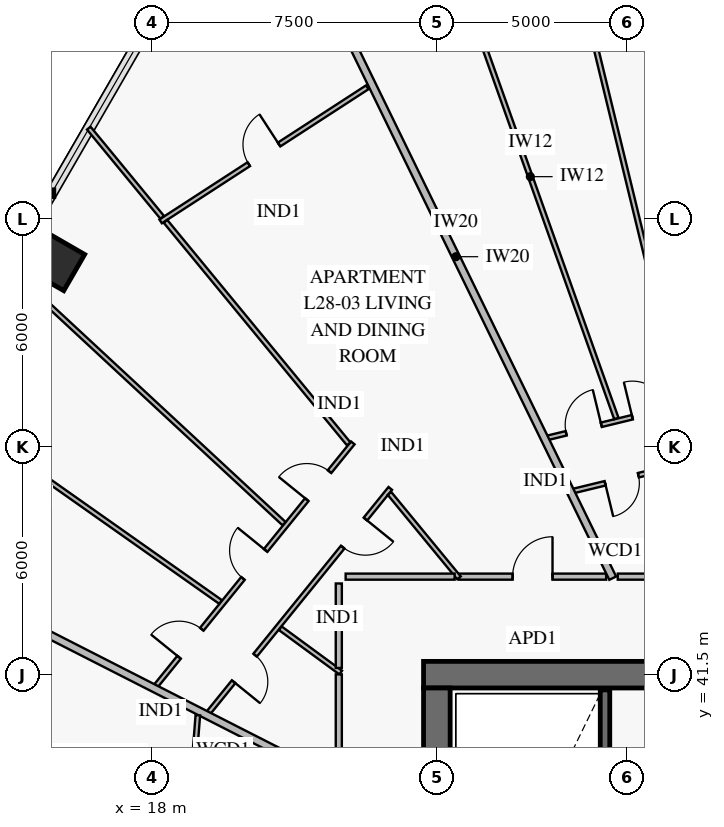
"""IFC4 building model, lengths in metres.
Left out: names, types, materials, properties, quantities, classifications, styles, units other than length and angle.
Written with IfcOpenShell. Run it as: python <this file> out.ifc"""

import sys

from ifc_helpers import new_model, si_unit, direction, frame, frame_2d, origin, origin_2d, place, context, subcontext, project, spatial, rectangle, extrude, element, fill, save


model = new_model("IFC4")
c1 = context("Model", 3, precision=1e-05, world=origin(), true_north=direction((0.0, 1.0)))
c2 = subcontext(c1, "Body", "Model", "MODEL_VIEW")
j1 = project(units=[si_unit("LENGTHUNIT", "METRE"), si_unit("PLANEANGLEUNIT", "RADIAN")], contexts=[c1])
p1 = place(None, origin())
s1 = spatial("IfcSite", under=j1, at=p1, CompositionType="ELEMENT")
p2 = place(p1, origin())
s2 = spatial("IfcBuilding", under=s1, at=p2, CompositionType="ELEMENT")
p3 = place(p2, frame((0.0, 0.0, 115.2)))
s3 = spatial("IfcBuildingStorey", under=s2, at=p3, CompositionType="ELEMENT", Elevation=115.2)
p4 = place(p3, frame((36.75, 41.5, 0.0), z_axis=(0.0, 0.0, 1.0), x_axis=(-1.0, 0.0, 0.0)))
e1 = element("IfcWall", 1, at=p4, inside=s3, PredefinedType="SHEAR", context=c2, shape_type="SweptSolid", body=[
    extrude(rectangle(XDim=11.6, YDim=0.7, at=frame_2d((5.8, 0.0))), origin(), (0.0, 0.0, 1.0), 3.8),
])
p5 = place(p4, frame((4.25, 0.0, 0.0)))
e2 = element("IfcOpeningElement", 2, at=p5, cuts=e1, PredefinedType="OPENING", context=c2, shape_type="SweptSolid", body=[
    extrude(rectangle(XDim=1.1, YDim=2.15, at=frame_2d((0.55, 1.075))), frame((0.0, 0.362, 0.0), z_axis=(0.0, -1.0, 0.0), x_axis=(1.0, 0.0, 0.0)), (0.0, 0.0, 1.0), 0.724),
])
p6 = place(p3, frame((25.5, 22.85, 0.0), z_axis=(0.0, 0.0, 1.0), x_axis=(0.0, 1.0, 0.0)))
e3 = element("IfcWall", 3, at=p6, inside=s3, PredefinedType="SHEAR", context=c2, shape_type="SweptSolid", body=[
    extrude(rectangle(XDim=18.3, YDim=0.7, at=frame_2d((9.15, 0.0))), origin(), (0.0, 0.0, 1.0), 3.8),
])
p7 = place(p6, frame((8.9, 0.0, 0.0)))
e4 = element("IfcOpeningElement", 4, at=p7, cuts=e3, PredefinedType="OPENING", context=c2, shape_type="SweptSolid", body=[
    extrude(rectangle(XDim=1.1, YDim=2.15, at=frame_2d((0.55, 1.075))), frame((0.0, 0.362, 0.0), z_axis=(0.0, -1.0, 0.0), x_axis=(1.0, 0.0, 0.0)), (0.0, 0.0, 1.0), 0.724),
])
p8 = place(p3, frame((15.481, 52.357, 0.0), z_axis=(0.0, 0.0, 1.0), x_axis=(-0.5, -0.866025403784, 0.0)))
e5 = element("IfcColumn", 5, at=p8, inside=s3, PredefinedType="COLUMN", context=c2, shape_type="SweptSolid", body=[
    extrude(rectangle(XDim=1.1, YDim=1.1, at=origin_2d()), origin(), (0.0, 0.0, 1.0), 3.55),
])
p9 = place(p3, frame((29.925, 31.4, 0.0), z_axis=(0.0, 0.0, 1.0), x_axis=(0.0, 1.0, 0.0)))
e6 = element("IfcWall", 6, at=p9, inside=s3, PredefinedType="SOLIDWALL", context=c2, shape_type="SweptSolid", body=[
    extrude(rectangle(XDim=9.7, YDim=0.25, at=frame_2d((4.85, 0.0))), origin(), (0.0, 0.0, 1.0), 3.8),
])
p10 = place(p3, frame((35.594, 47.914, 0.0), z_axis=(0.0, 0.0, 1.0), x_axis=(-0.971707679159, -0.236186761404, 0.0)))
e7 = element("IfcWall", 7, at=p10, inside=s3, PredefinedType="PARTITIONING", context=c2, shape_type="SweptSolid", body=[
    extrude(rectangle(XDim=6.728, YDim=0.12, at=frame_2d((3.364, 0.0))), origin(), (0.0, 0.0, 1.0), 2.85),
])
p11 = place(p10, frame((1.644, 0.0, 0.0)))
e8 = element("IfcOpeningElement", 8, at=p11, cuts=e7, PredefinedType="OPENING", context=c2, shape_type="SweptSolid", body=[
    extrude(rectangle(XDim=0.95, YDim=2.1, at=frame_2d((0.475, 1.05))), frame((0.0, 0.072, 0.0), z_axis=(0.0, -1.0, 0.0), x_axis=(1.0, 0.0, 0.0)), (0.0, 0.0, 1.0), 0.144),
])
p12 = place(p10, frame((4.931, 0.0, 0.0)))
e9 = element("IfcOpeningElement", 9, at=p12, cuts=e7, PredefinedType="OPENING", context=c2, shape_type="SweptSolid", body=[
    extrude(rectangle(XDim=0.9, YDim=2.1, at=frame_2d((0.45, 1.05))), frame((0.0, 0.072, 0.0), z_axis=(0.0, -1.0, 0.0), x_axis=(1.0, 0.0, 0.0)), (0.0, 0.0, 1.0), 0.144),
])
p13 = place(p3, frame((35.545, 49.466, 0.0), z_axis=(0.0, 0.0, 1.0), x_axis=(-0.971712641416, -0.236166345002, 0.0)))
e10 = element("IfcWall", 10, at=p13, inside=s3, PredefinedType="PARTITIONING", context=c2, shape_type="SweptSolid", body=[
    extrude(rectangle(XDim=7.365, YDim=0.12, at=frame_2d((3.683, 0.0))), origin(), (0.0, 0.0, 1.0), 2.85),
])
p14 = place(p13, frame((0.531, 0.0, 0.0)))
e11 = element("IfcOpeningElement", 11, at=p14, cuts=e10, PredefinedType="OPENING", context=c2, shape_type="SweptSolid", body=[
    extrude(rectangle(XDim=0.95, YDim=2.1, at=frame_2d((0.475, 1.05))), frame((0.0, 0.072, 0.0), z_axis=(0.0, -1.0, 0.0), x_axis=(1.0, 0.0, 0.0)), (0.0, 0.0, 1.0), 0.144),
])
p15 = place(p13, frame((2.322, 0.0, 0.0)))
e12 = element("IfcOpeningElement", 12, at=p15, cuts=e10, PredefinedType="OPENING", context=c2, shape_type="SweptSolid", body=[
    extrude(rectangle(XDim=0.95, YDim=2.1, at=frame_2d((0.475, 1.05))), frame((0.0, 0.072, 0.0), z_axis=(0.0, -1.0, 0.0), x_axis=(1.0, 0.0, 0.0)), (0.0, 0.0, 1.0), 0.144),
])
p16 = place(p13, frame((4.094, 0.0, 0.0)))
e13 = element("IfcOpeningElement", 13, at=p16, cuts=e10, PredefinedType="OPENING", context=c2, shape_type="SweptSolid", body=[
    extrude(rectangle(XDim=0.95, YDim=2.1, at=frame_2d((0.475, 1.05))), frame((0.0, 0.072, 0.0), z_axis=(0.0, -1.0, 0.0), x_axis=(1.0, 0.0, 0.0)), (0.0, 0.0, 1.0), 0.144),
])
p17 = place(p13, frame((5.885, 0.0, 0.0)))
e14 = element("IfcOpeningElement", 14, at=p17, cuts=e10, PredefinedType="OPENING", context=c2, shape_type="SweptSolid", body=[
    extrude(rectangle(XDim=0.95, YDim=2.1, at=frame_2d((0.475, 1.05))), frame((0.0, 0.072, 0.0), z_axis=(0.0, -1.0, 0.0), x_axis=(1.0, 0.0, 0.0)), (0.0, 0.0, 1.0), 0.144),
])
p18 = place(p3, frame((23.669, 56.957, 0.0), z_axis=(0.0, 0.0, 1.0), x_axis=(-0.838859022157, -0.544348731005, 0.0)))
e15 = element("IfcWall", 15, at=p18, inside=s3, PredefinedType="PARTITIONING", context=c2, shape_type="SweptSolid", body=[
    extrude(rectangle(XDim=6.482, YDim=0.12, at=frame_2d((3.241, 0.0))), origin(), (0.0, 0.0, 1.0), 2.8),
])
p19 = place(p18, frame((2.766, 0.0, 0.0)))
e16 = element("IfcOpeningElement", 16, at=p19, cuts=e15, PredefinedType="OPENING", context=c2, shape_type="SweptSolid", body=[
    extrude(rectangle(XDim=0.95, YDim=2.1, at=frame_2d((0.475, 1.05))), frame((0.0, 0.072, 0.0), z_axis=(0.0, -1.0, 0.0), x_axis=(1.0, 0.0, 0.0)), (0.0, 0.0, 1.0), 0.144),
])
p20 = place(p3, frame((24.275, 46.402, 0.0), z_axis=(0.0, 0.0, 1.0), x_axis=(-0.629602187024, -0.776917682959, 0.0)))
e17 = element("IfcWall", 17, at=p20, inside=s3, PredefinedType="PARTITIONING", context=c2, shape_type="SweptSolid", body=[
    extrude(rectangle(XDim=7.614, YDim=0.12, at=frame_2d((3.807, 0.0))), origin(), (0.0, 0.0, 1.0), 2.85),
])
p21 = place(p20, frame((1.038, 0.0, 0.0)))
e18 = element("IfcOpeningElement", 18, at=p21, cuts=e17, PredefinedType="OPENING", context=c2, shape_type="SweptSolid", body=[
    extrude(rectangle(XDim=0.95, YDim=2.1, at=frame_2d((0.475, 1.05))), frame((0.0, 0.072, 0.0), z_axis=(0.0, -1.0, 0.0), x_axis=(1.0, 0.0, 0.0)), (0.0, 0.0, 1.0), 0.144),
])
p22 = place(p20, frame((5.648, 0.0, 0.0)))
e19 = element("IfcOpeningElement", 19, at=p22, cuts=e17, PredefinedType="OPENING", context=c2, shape_type="SweptSolid", body=[
    extrude(rectangle(XDim=0.9, YDim=2.1, at=frame_2d((0.45, 1.05))), frame((0.0, 0.072, 0.0), z_axis=(0.0, -1.0, 0.0), x_axis=(1.0, 0.0, 0.0)), (0.0, 0.0, 1.0), 0.144),
])
p23 = place(p3, frame((23.289, 47.599, 0.0), z_axis=(0.0, 0.0, 1.0), x_axis=(-0.629618678783, -0.776904318001, 0.0)))
e20 = element("IfcWall", 20, at=p23, inside=s3, PredefinedType="PARTITIONING", context=c2, shape_type="SweptSolid", body=[
    extrude(rectangle(XDim=8.233, YDim=0.12, at=frame_2d((4.117, 0.0))), origin(), (0.0, 0.0, 1.0), 2.85),
])
p24 = place(p23, frame((0.972, 0.0, 0.0)))
e21 = element("IfcOpeningElement", 21, at=p24, cuts=e20, PredefinedType="OPENING", context=c2, shape_type="SweptSolid", body=[
    extrude(rectangle(XDim=0.95, YDim=2.1, at=frame_2d((0.475, 1.05))), frame((0.0, 0.072, 0.0), z_axis=(0.0, -1.0, 0.0), x_axis=(1.0, 0.0, 0.0)), (0.0, 0.0, 1.0), 0.144),
])
p25 = place(p23, frame((3.642, 0.0, 0.0)))
e22 = element("IfcOpeningElement", 22, at=p25, cuts=e20, PredefinedType="OPENING", context=c2, shape_type="SweptSolid", body=[
    extrude(rectangle(XDim=0.95, YDim=2.1, at=frame_2d((0.475, 1.05))), frame((0.0, 0.072, 0.0), z_axis=(0.0, -1.0, 0.0), x_axis=(1.0, 0.0, 0.0)), (0.0, 0.0, 1.0), 0.144),
])
p26 = place(p23, frame((6.311, 0.0, 0.0)))
e23 = element("IfcOpeningElement", 23, at=p26, cuts=e20, PredefinedType="OPENING", context=c2, shape_type="SweptSolid", body=[
    extrude(rectangle(XDim=0.95, YDim=2.1, at=frame_2d((0.475, 1.05))), frame((0.0, 0.072, 0.0), z_axis=(0.0, -1.0, 0.0), x_axis=(1.0, 0.0, 0.0)), (0.0, 0.0, 1.0), 0.144),
])
p27 = place(p3, frame((29.955, 44.08, 0.0), z_axis=(0.0, 0.0, 1.0), x_axis=(-1.0, 0.0, 0.0)))
e24 = element("IfcWall", 24, at=p27, inside=s3, PredefinedType="PARTITIONING", context=c2, shape_type="SweptSolid", body=[
    extrude(rectangle(XDim=3.873, YDim=0.16, at=frame_2d((1.937, 0.0))), origin(), (0.0, 0.0, 1.0), 3.55),
])
p28 = place(p27, frame((1.411, 0.0, 0.0)))
e25 = element("IfcOpeningElement", 25, at=p28, cuts=e24, PredefinedType="OPENING", context=c2, shape_type="SweptSolid", body=[
    extrude(rectangle(XDim=1.05, YDim=2.15, at=frame_2d((0.525, 1.075))), frame((0.0, 0.092, 0.0), z_axis=(0.0, -1.0, 0.0), x_axis=(1.0, 0.0, 0.0)), (0.0, 0.0, 1.0), 0.184),
])
p29 = place(p3, frame((31.95, 48.662, 0.0), z_axis=(0.0, 0.0, 1.0), x_axis=(-0.236162753776, 0.971713514226, 0.0)))
e26 = element("IfcWall", 26, at=p29, inside=s3, PredefinedType="PARTITIONING", context=c2, shape_type="SweptSolid", body=[
    extrude(rectangle(XDim=11.646, YDim=0.12, at=frame_2d((5.823, 0.0))), origin(), (0.0, 0.0, 1.0), 2.8),
])
p30 = place(p3, frame((30.223, 48.242, 0.0), z_axis=(0.0, 0.0, 1.0), x_axis=(-0.335110936566, 0.942178677425, 0.0)))
e27 = element("IfcWall", 27, at=p30, inside=s3, PredefinedType="PARTITIONING", context=c2, shape_type="SweptSolid", body=[
    extrude(rectangle(XDim=13.507, YDim=0.12, at=frame_2d((6.753, 0.0))), origin(), (0.0, 0.0, 1.0), 2.8),
])
p31 = place(p3, frame((30.128, 44.04, 0.0), z_axis=(0.0, 0.0, 1.0), x_axis=(-0.438372268699, 0.898793499106, 0.0)))
e28 = element("IfcWall", 28, at=p31, inside=s3, PredefinedType="PARTITIONING", context=c2, shape_type="SweptSolid", body=[
    extrude(rectangle(XDim=18.823, YDim=0.2, at=frame_2d((9.412, 0.0))), origin(), (0.0, 0.0, 1.0), 2.8),
])
p32 = place(p3, frame((22.97, 41.556, 0.0), z_axis=(0.0, 0.0, 1.0), x_axis=(-0.806432554287, 0.591326082113, 0.0)))
e29 = element("IfcWall", 29, at=p32, inside=s3, PredefinedType="PARTITIONING", context=c2, shape_type="SweptSolid", body=[
    extrude(rectangle(XDim=1.971, YDim=0.12, at=frame_2d((0.986, 0.0))), origin(), (0.0, 0.0, 1.0), 3.55),
])
p33 = place(p3, frame((21.479, 45.475, 0.0), z_axis=(0.0, 0.0, 1.0), x_axis=(-0.733013816474, 0.680213749389, 0.0)))
e30 = element("IfcWall", 30, at=p33, inside=s3, PredefinedType="PARTITIONING", context=c2, shape_type="SweptSolid", body=[
    extrude(rectangle(XDim=9.904, YDim=0.12, at=frame_2d((4.952, 0.0))), origin(), (0.0, 0.0, 1.0), 2.8),
])
p34 = place(p3, frame((19.809, 43.413, 0.0), z_axis=(0.0, 0.0, 1.0), x_axis=(-0.817344716763, 0.57614895121, 0.0)))
e31 = element("IfcWall", 31, at=p34, inside=s3, PredefinedType="PARTITIONING", context=c2, shape_type="SweptSolid", body=[
    extrude(rectangle(XDim=9.278, YDim=0.12, at=frame_2d((4.639, 0.0))), origin(), (0.0, 0.0, 1.0), 2.8),
])
p35 = place(p3, frame((26.082, 44.049, 0.0), z_axis=(0.0, 0.0, 1.0), x_axis=(-0.635546545523, 0.772062554767, 0.0)))
e32 = element("IfcWall", 32, at=p35, inside=s3, PredefinedType="PARTITIONING", context=c2, shape_type="SweptSolid", body=[
    extrude(rectangle(XDim=2.876, YDim=0.12, at=frame_2d((1.438, 0.0))), origin(), (0.0, 0.0, 1.0), 3.55),
])
p36 = place(p3, frame((23.18, 47.574, 0.0), z_axis=(0.0, 0.0, 1.0), x_axis=(-0.635541406611, 0.772066784989, 0.0)))
e33 = element("IfcWall", 33, at=p36, inside=s3, PredefinedType="PARTITIONING", context=c2, shape_type="SweptSolid", body=[
    extrude(rectangle(XDim=7.586, YDim=0.12, at=frame_2d((3.793, 0.0))), origin(), (0.0, 0.0, 1.0), 3.1),
])
p37 = place(p3, frame((18.272, 53.536, 0.0), z_axis=(0.0, 0.0, 1.0), x_axis=(-0.635518574301, 0.772085579271, 0.0)))
e34 = element("IfcWall", 34, at=p37, inside=s3, PredefinedType="PARTITIONING", context=c2, shape_type="SweptSolid", body=[
    extrude(rectangle(XDim=3.039, YDim=0.12, at=frame_2d((1.52, 0.0))), origin(), (0.0, 0.0, 1.0), 2.8),
])
p38 = place(p3, frame((22.96, 38.644, 0.0), z_axis=(0.0, 0.0, 1.0), x_axis=(-0.891012124705, 0.453979507939, 0.0)))
e35 = element("IfcWall", 35, at=p38, inside=s3, PredefinedType="PARTITIONING", context=c2, shape_type="SweptSolid", body=[
    extrude(rectangle(XDim=14.363, YDim=0.2, at=frame_2d((7.182, 0.0))), origin(), (0.0, 0.0, 1.0), 2.8),
])
p39 = place(p3, frame((19.211, 40.433, 0.0), z_axis=(0.0, 0.0, 1.0), x_axis=(-0.078465431449, -0.996916835081, 0.0)))
e36 = element("IfcWall", 36, at=p39, inside=s3, PredefinedType="PARTITIONING", context=c2, shape_type="SweptSolid", body=[
    extrude(rectangle(XDim=5.414, YDim=0.12, at=frame_2d((2.707, 0.0))), origin(), (0.0, 0.0, 1.0), 2.85),
])
p40 = place(p3, frame((32.351, 44.08, 0.0), z_axis=(0.0, 0.0, 1.0), x_axis=(-1.0, 0.0, 0.0)))
e37 = element("IfcWall", 37, at=p40, inside=s3, PredefinedType="PARTITIONING", context=c2, shape_type="SweptSolid", body=[
    extrude(rectangle(XDim=2.09, YDim=0.16, at=frame_2d((1.045, 0.0))), origin(), (0.0, 0.0, 1.0), 3.55),
])
p41 = place(p3, frame((25.968, 44.08, 0.0), z_axis=(0.0, 0.0, 1.0), x_axis=(-1.0, 0.0, 0.0)))
e38 = element("IfcWall", 38, at=p41, inside=s3, PredefinedType="PARTITIONING", context=c2, shape_type="SweptSolid", body=[
    extrude(rectangle(XDim=2.868, YDim=0.16, at=frame_2d((1.434, 0.0))), origin(), (0.0, 0.0, 1.0), 2.85),
])
p42 = place(p3, frame((22.92, 43.9, 0.0), z_axis=(0.0, 0.0, 1.0), x_axis=(0.0, -1.0, 0.0)))
e39 = element("IfcWall", 39, at=p42, inside=s3, PredefinedType="PARTITIONING", context=c2, shape_type="SweptSolid", body=[
    extrude(rectangle(XDim=2.223, YDim=0.16, at=frame_2d((1.112, 0.0))), origin(), (0.0, 0.0, 1.0), 3.55),
])
p43 = place(p3, frame((22.92, 41.508, 0.0), z_axis=(0.0, 0.0, 1.0), x_axis=(0.0, -1.0, 0.0)))
e40 = element("IfcWall", 40, at=p43, inside=s3, PredefinedType="PARTITIONING", context=c2, shape_type="SweptSolid", body=[
    extrude(rectangle(XDim=2.677, YDim=0.16, at=frame_2d((1.338, 0.0))), origin(), (0.0, 0.0, 1.0), 3.55),
])
p44 = place(p12, origin())
e41 = element("IfcDoor", 41, at=p44, inside=s3, OperationType="SINGLE_SWING_RIGHT", PredefinedType="DOOR", context=c2, shape_type="SweptSolid", body=[
    extrude(rectangle(XDim=0.9, YDim=2.1, at=frame_2d((0.45, 1.05))), frame((0.0, 0.025, 0.0), z_axis=(0.0, -1.0, 0.0), x_axis=(1.0, 0.0, 0.0)), (0.0, 0.0, 1.0), 0.05),
])
fill(e9, e41)
p45 = place(p16, frame((0.95, 0.0, 0.0), z_axis=(0.0, 0.0, 1.0), x_axis=(-1.0, 0.0, 0.0)))
e42 = element("IfcDoor", 42, at=p45, inside=s3, OperationType="SINGLE_SWING_LEFT", PredefinedType="DOOR", context=c2, shape_type="SweptSolid", body=[
    extrude(rectangle(XDim=0.95, YDim=2.1, at=frame_2d((0.475, 1.05))), frame((0.0, 0.025, 0.0), z_axis=(0.0, -1.0, 0.0), x_axis=(1.0, 0.0, 0.0)), (0.0, 0.0, 1.0), 0.05),
])
fill(e13, e42)
p46 = place(p17, frame((0.95, 0.0, 0.0), z_axis=(0.0, 0.0, 1.0), x_axis=(-1.0, 0.0, 0.0)))
e43 = element("IfcDoor", 43, at=p46, inside=s3, OperationType="SINGLE_SWING_RIGHT", PredefinedType="DOOR", context=c2, shape_type="SweptSolid", body=[
    extrude(rectangle(XDim=0.95, YDim=2.1, at=frame_2d((0.475, 1.05))), frame((0.0, 0.025, 0.0), z_axis=(0.0, -1.0, 0.0), x_axis=(1.0, 0.0, 0.0)), (0.0, 0.0, 1.0), 0.05),
])
fill(e14, e43)
p47 = place(p19, frame((0.95, 0.0, 0.0), z_axis=(0.0, 0.0, 1.0), x_axis=(-1.0, 0.0, 0.0)))
e44 = element("IfcDoor", 44, at=p47, inside=s3, OperationType="SINGLE_SWING_RIGHT", PredefinedType="DOOR", context=c2, shape_type="SweptSolid", body=[
    extrude(rectangle(XDim=0.95, YDim=2.1, at=frame_2d((0.475, 1.05))), frame((0.0, 0.025, 0.0), z_axis=(0.0, -1.0, 0.0), x_axis=(1.0, 0.0, 0.0)), (0.0, 0.0, 1.0), 0.05),
])
fill(e16, e44)
p48 = place(p21, origin())
e45 = element("IfcDoor", 45, at=p48, inside=s3, OperationType="SINGLE_SWING_LEFT", PredefinedType="DOOR", context=c2, shape_type="SweptSolid", body=[
    extrude(rectangle(XDim=0.95, YDim=2.1, at=frame_2d((0.475, 1.05))), frame((0.0, 0.025, 0.0), z_axis=(0.0, -1.0, 0.0), x_axis=(1.0, 0.0, 0.0)), (0.0, 0.0, 1.0), 0.05),
])
fill(e18, e45)
p49 = place(p22, origin())
e46 = element("IfcDoor", 46, at=p49, inside=s3, OperationType="SINGLE_SWING_RIGHT", PredefinedType="DOOR", context=c2, shape_type="SweptSolid", body=[
    extrude(rectangle(XDim=0.9, YDim=2.1, at=frame_2d((0.45, 1.05))), frame((0.0, 0.025, 0.0), z_axis=(0.0, -1.0, 0.0), x_axis=(1.0, 0.0, 0.0)), (0.0, 0.0, 1.0), 0.05),
])
fill(e19, e46)
p50 = place(p24, frame((0.95, 0.0, 0.0), z_axis=(0.0, 0.0, 1.0), x_axis=(-1.0, 0.0, 0.0)))
e47 = element("IfcDoor", 47, at=p50, inside=s3, OperationType="SINGLE_SWING_LEFT", PredefinedType="DOOR", context=c2, shape_type="SweptSolid", body=[
    extrude(rectangle(XDim=0.95, YDim=2.1, at=frame_2d((0.475, 1.05))), frame((0.0, 0.025, 0.0), z_axis=(0.0, -1.0, 0.0), x_axis=(1.0, 0.0, 0.0)), (0.0, 0.0, 1.0), 0.05),
])
fill(e21, e47)
p51 = place(p25, frame((0.95, 0.0, 0.0), z_axis=(0.0, 0.0, 1.0), x_axis=(-1.0, 0.0, 0.0)))
e48 = element("IfcDoor", 48, at=p51, inside=s3, OperationType="SINGLE_SWING_RIGHT", PredefinedType="DOOR", context=c2, shape_type="SweptSolid", body=[
    extrude(rectangle(XDim=0.95, YDim=2.1, at=frame_2d((0.475, 1.05))), frame((0.0, 0.025, 0.0), z_axis=(0.0, -1.0, 0.0), x_axis=(1.0, 0.0, 0.0)), (0.0, 0.0, 1.0), 0.05),
])
fill(e22, e48)
p52 = place(p26, frame((0.95, 0.0, 0.0), z_axis=(0.0, 0.0, 1.0), x_axis=(-1.0, 0.0, 0.0)))
e49 = element("IfcDoor", 49, at=p52, inside=s3, OperationType="SINGLE_SWING_LEFT", PredefinedType="DOOR", context=c2, shape_type="SweptSolid", body=[
    extrude(rectangle(XDim=0.95, YDim=2.1, at=frame_2d((0.475, 1.05))), frame((0.0, 0.025, 0.0), z_axis=(0.0, -1.0, 0.0), x_axis=(1.0, 0.0, 0.0)), (0.0, 0.0, 1.0), 0.05),
])
fill(e23, e49)
p53 = place(p28, frame((1.05, 0.0, 0.0), z_axis=(0.0, 0.0, 1.0), x_axis=(-1.0, 0.0, 0.0)))
e50 = element("IfcDoor", 50, at=p53, inside=s3, OperationType="SINGLE_SWING_RIGHT", PredefinedType="DOOR", context=c2, shape_type="SweptSolid", body=[
    extrude(rectangle(XDim=1.05, YDim=2.15, at=frame_2d((0.525, 1.075))), frame((0.0, 0.025, 0.0), z_axis=(0.0, -1.0, 0.0), x_axis=(1.0, 0.0, 0.0)), (0.0, 0.0, 1.0), 0.05),
])
fill(e25, e50)
save(model, sys.argv[1])
